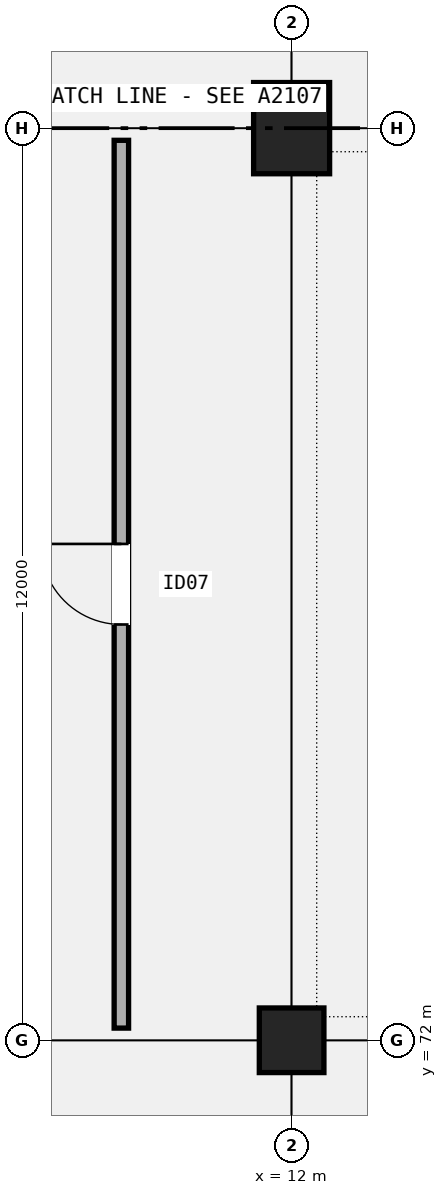
"""IFC4 building model, lengths in metres.
Left out: names, types, materials, properties, quantities, classifications, styles, units other than length and angle.
Written with IfcOpenShell. Run it as: python <this file> out.ifc"""

import sys

from ifc_helpers import new_model, si_unit, direction, frame, frame_2d, origin, origin_2d, place, context, subcontext, project, spatial, rectangle, circle, extrude, element, fill, save


model = new_model("IFC4")
c1 = context("Model", 3, precision=1e-05, world=origin(), true_north=direction((0.0, 1.0)))
c2 = subcontext(c1, "Body", "Model", "MODEL_VIEW")
j1 = project(units=[si_unit("LENGTHUNIT", "METRE"), si_unit("PLANEANGLEUNIT", "RADIAN")], contexts=[c1])
p1 = place(None, origin())
s1 = spatial("IfcSite", under=j1, at=p1, CompositionType="ELEMENT")
p2 = place(p1, origin())
s2 = spatial("IfcBuilding", under=s1, at=p2, CompositionType="ELEMENT")
p3 = place(p2, frame((0.0, 0.0, -4.8)))
s3 = spatial("IfcBuildingStorey", under=s2, at=p3, CompositionType="ELEMENT", Elevation=-4.8)
p4 = place(p3, frame((12.0, 72.0, 0.0), z_axis=(0.0, 0.0, 1.0), x_axis=(1.0, 0.0, 0.0)))
e1 = element("IfcColumn", 1, at=p4, inside=s3, PredefinedType="COLUMN", context=c2, shape_type="SweptSolid", body=[
    extrude(circle(Radius=0.425, at=origin_2d()), origin(), (0.0, 0.0, 1.0), 4.8),
])
p5 = place(p3, frame((12.0, 84.0, 0.0), z_axis=(0.0, 0.0, 1.0), x_axis=(1.0, 0.0, 0.0)))
e2 = element("IfcColumn", 2, at=p5, inside=s3, PredefinedType="COLUMN", context=c2, shape_type="SweptSolid", body=[
    extrude(rectangle(XDim=1.0, YDim=1.2, at=origin_2d()), origin(), (0.0, 0.0, 1.0), 4.8),
])
p6 = place(p3, frame((9.76, 72.16, 0.0), z_axis=(0.0, 0.0, 1.0), x_axis=(0.0, 1.0, 0.0)))
e3 = element("IfcWall", 3, at=p6, inside=s3, PredefinedType="PARTITIONING", context=c2, shape_type="SweptSolid", body=[
    extrude(rectangle(XDim=11.68, YDim=0.19, at=frame_2d((5.84, 0.0))), origin(), (0.0, 0.0, 1.0), 3.92),
])
p7 = place(p6, frame((5.31, 0.0, 0.0)))
e4 = element("IfcOpeningElement", 4, at=p7, cuts=e3, PredefinedType="OPENING", context=c2, shape_type="SweptSolid", body=[
    extrude(rectangle(XDim=1.06, YDim=2.15, at=frame_2d((0.53, 1.075))), frame((0.0, 0.105, 0.0), z_axis=(0.0, -1.0, 0.0), x_axis=(1.0, 0.0, 0.0)), (0.0, 0.0, 1.0), 0.21),
])
p8 = place(p7, origin())
e5 = element("IfcDoor", 5, at=p8, inside=s3, OperationType="SINGLE_SWING_RIGHT", PredefinedType="DOOR", context=c2, shape_type="SweptSolid", body=[
    extrude(rectangle(XDim=1.06, YDim=2.15, at=frame_2d((0.53, 1.075))), frame((0.0, 0.025, 0.0), z_axis=(0.0, -1.0, 0.0), x_axis=(1.0, 0.0, 0.0)), (0.0, 0.0, 1.0), 0.05),
])
fill(e4, e5)
save(model, sys.argv[1])
